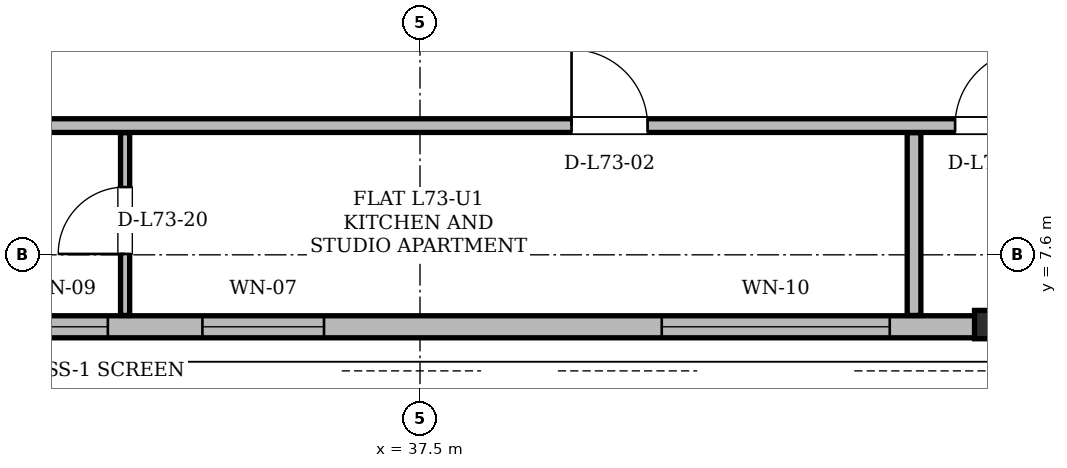
"""IFC4 building model, lengths in metres.
Left out: names, types, materials, properties, quantities, classifications, styles, units other than length and angle.
Written with IfcOpenShell. Run it as: python <this file> out.ifc"""

import sys

from ifc_helpers import new_model, si_unit, direction, frame, frame_2d, origin, origin_2d, place, context, subcontext, project, spatial, rectangle, i_section, extrude, element, fill, save


model = new_model("IFC4")
c1 = context("Model", 3, precision=1e-05, world=origin(), true_north=direction((0.0, 1.0)))
c2 = subcontext(c1, "Body", "Model", "MODEL_VIEW")
j1 = project(units=[si_unit("LENGTHUNIT", "METRE"), si_unit("PLANEANGLEUNIT", "RADIAN")], contexts=[c1])
p1 = place(None, origin())
s1 = spatial("IfcSite", under=j1, at=p1, CompositionType="ELEMENT")
p2 = place(p1, origin())
s2 = spatial("IfcBuilding", under=s1, at=p2, CompositionType="ELEMENT")
p3 = place(p2, frame((0.0, 0.0, 277.2)))
s3 = spatial("IfcBuildingStorey", under=s2, at=p3, CompositionType="ELEMENT", Elevation=277.2)
p4 = place(p3, frame((44.978, 6.653, 0.005), z_axis=(0.002384111431, 0.015057545883, 0.99988378641), x_axis=(-0.987696138675, 0.156385221957, 0.0)))
e1 = element("IfcColumn", 1, at=p4, inside=s3, PredefinedType="COLUMN", context=c2, shape_type="SweptSolid", body=[
    extrude(i_section(OverallWidth=0.373, OverallDepth=0.373, WebThickness=0.016, FlangeThickness=0.026, at=origin_2d()), origin(), (0.0, 0.0, 1.0), 3.891),
])
p5 = place(p3, frame((18.805, 6.653, 0.0), z_axis=(0.0, 0.0, 1.0), x_axis=(1.0, 0.0, 0.0)))
e2 = element("IfcWall", 2, at=p5, inside=s3, PredefinedType="SOLIDWALL", context=c2, shape_type="SweptSolid", body=[
    extrude(rectangle(XDim=37.389, YDim=0.29, at=frame_2d((18.695, 0.0))), origin(), (0.0, 0.0, 1.0), 3.058),
])
p6 = place(p5, frame((8.034, 0.0, 0.0)))
e3 = element("IfcOpeningElement", 3, at=p6, cuts=e2, PredefinedType="OPENING", context=c2, shape_type="SweptSolid", body=[
    extrude(rectangle(XDim=1.5, YDim=2.2, at=frame_2d((0.75, 1.1))), frame((0.0, 0.145, 0.0), z_axis=(0.0, -1.0, 0.0), x_axis=(1.0, 0.0, 0.0)), (0.0, 0.0, 1.0), 0.29),
])
p7 = place(p5, frame((32.25, 0.0, 0.0)))
e4 = element("IfcOpeningElement", 4, at=p7, cuts=e2, PredefinedType="OPENING", context=c2, shape_type="SweptSolid", body=[
    extrude(rectangle(XDim=1.5, YDim=2.2, at=frame_2d((0.75, 1.1))), frame((0.0, 0.145, 0.0), z_axis=(0.0, -1.0, 0.0), x_axis=(1.0, 0.0, 0.0)), (0.0, 0.0, 1.0), 0.29),
])
p8 = place(p5, frame((15.832, 0.0, 0.85)))
e5 = element("IfcOpeningElement", 5, at=p8, cuts=e2, PredefinedType="OPENING", context=c2, shape_type="SweptSolid", body=[
    extrude(rectangle(XDim=1.6, YDim=1.7, at=frame_2d((0.8, 0.85))), frame((0.0, 0.145, 0.0), z_axis=(0.0, -1.0, 0.0), x_axis=(1.0, 0.0, 0.0)), (0.0, 0.0, 1.0), 0.29),
])
p9 = place(p5, frame((21.875, 0.0, 0.85)))
e6 = element("IfcOpeningElement", 6, at=p9, cuts=e2, PredefinedType="OPENING", context=c2, shape_type="SweptSolid", body=[
    extrude(rectangle(XDim=3.0, YDim=2.098, at=frame_2d((1.5, 1.049))), frame((0.0, 0.145, 0.0), z_axis=(0.0, -1.0, 0.0), x_axis=(1.0, 0.0, 0.0)), (0.0, 0.0, 1.0), 0.29),
])
p10 = place(p5, frame((13.388, 0.0, 0.85)))
e7 = element("IfcOpeningElement", 7, at=p10, cuts=e2, PredefinedType="OPENING", context=c2, shape_type="SweptSolid", body=[
    extrude(rectangle(XDim=1.2, YDim=1.48, at=frame_2d((0.6, 0.74))), frame((0.0, 0.145, 0.0), z_axis=(0.0, -1.0, 0.0), x_axis=(1.0, 0.0, 0.0)), (0.0, 0.0, 1.0), 0.29),
])
p11 = place(p5, frame((27.673, 0.0, 0.85)))
e8 = element("IfcOpeningElement", 8, at=p11, cuts=e2, PredefinedType="OPENING", context=c2, shape_type="SweptSolid", body=[
    extrude(rectangle(XDim=1.2, YDim=1.48, at=frame_2d((0.6, 0.74))), frame((0.0, 0.145, 0.0), z_axis=(0.0, -1.0, 0.0), x_axis=(1.0, 0.0, 0.0)), (0.0, 0.0, 1.0), 0.29),
])
p12 = place(p5, frame((1.869, 0.0, 0.85)))
e9 = element("IfcOpeningElement", 9, at=p12, cuts=e2, PredefinedType="OPENING", context=c2, shape_type="SweptSolid", body=[
    extrude(rectangle(XDim=2.8, YDim=2.05, at=frame_2d((1.4, 1.025))), frame((0.0, 0.145, 0.0), z_axis=(0.0, -1.0, 0.0), x_axis=(1.0, 0.0, 0.0)), (0.0, 0.0, 1.0), 0.29),
])
p13 = place(p3, frame((25.6, 9.3, 0.0), z_axis=(0.0, 0.0, 1.0), x_axis=(1.0, 0.0, 0.0)))
e10 = element("IfcWall", 10, at=p13, inside=s3, PredefinedType="PARTITIONING", context=c2, shape_type="SweptSolid", body=[
    extrude(rectangle(XDim=21.85, YDim=0.18, at=frame_2d((10.925, 0.0))), origin(), (0.0, 0.0, 1.0), 3.68),
])
p14 = place(p13, frame((2.16, 0.0, 0.0)))
e11 = element("IfcOpeningElement", 11, at=p14, cuts=e10, PredefinedType="OPENING", context=c2, shape_type="SweptSolid", body=[
    extrude(rectangle(XDim=1.0, YDim=2.18, at=frame_2d((0.5, 1.09))), frame((0.0, 0.09, 0.0), z_axis=(0.0, -1.0, 0.0), x_axis=(1.0, 0.0, 0.0)), (0.0, 0.0, 1.0), 0.18),
])
p15 = place(p13, frame((13.894, 0.0, 0.0)))
e12 = element("IfcOpeningElement", 12, at=p15, cuts=e10, PredefinedType="OPENING", context=c2, shape_type="SweptSolid", body=[
    extrude(rectangle(XDim=1.0, YDim=2.18, at=frame_2d((0.5, 1.09))), frame((0.0, 0.09, 0.0), z_axis=(0.0, -1.0, 0.0), x_axis=(1.0, 0.0, 0.0)), (0.0, 0.0, 1.0), 0.18),
])
p16 = place(p13, frame((18.94, 0.0, 0.0)))
e13 = element("IfcOpeningElement", 13, at=p16, cuts=e10, PredefinedType="OPENING", context=c2, shape_type="SweptSolid", body=[
    extrude(rectangle(XDim=1.0, YDim=2.18, at=frame_2d((0.5, 1.09))), frame((0.0, 0.09, 0.0), z_axis=(0.0, -1.0, 0.0), x_axis=(1.0, 0.0, 0.0)), (0.0, 0.0, 1.0), 0.18),
])
p17 = place(p3, frame((33.62, 6.802, 0.0), z_axis=(0.0, 0.0, 1.0), x_axis=(0.0, 1.0, 0.0)))
e14 = element("IfcWall", 14, at=p17, inside=s3, PredefinedType="PARTITIONING", context=c2, shape_type="SweptSolid", body=[
    extrude(rectangle(XDim=2.404, YDim=0.12, at=frame_2d((1.202, 0.0))), origin(), (0.0, 0.0, 1.0), 3.68),
])
p18 = place(p17, frame((0.81, 0.0, 0.0)))
e15 = element("IfcOpeningElement", 15, at=p18, cuts=e14, PredefinedType="OPENING", context=c2, shape_type="SweptSolid", body=[
    extrude(rectangle(XDim=0.88, YDim=2.08, at=frame_2d((0.44, 1.04))), frame((0.0, 0.06, 0.0), z_axis=(0.0, -1.0, 0.0), x_axis=(1.0, 0.0, 0.0)), (0.0, 0.0, 1.0), 0.12),
])
p19 = place(p3, frame((44.0, 6.802, 0.0), z_axis=(0.0, 0.0, 1.0), x_axis=(0.0, 1.0, 0.0)))
e16 = element("IfcWall", 16, at=p19, inside=s3, PredefinedType="PARTITIONING", context=c2, shape_type="SweptSolid", body=[
    extrude(rectangle(XDim=2.404, YDim=0.18, at=frame_2d((1.202, 0.0))), origin(), (0.0, 0.0, 1.0), 3.68),
])
p20 = place(p8, origin())
e17 = element("IfcWindow", 17, at=p20, inside=s3, PartitioningType="SINGLE_PANEL", PredefinedType="WINDOW", context=c2, shape_type="SweptSolid", body=[
    extrude(rectangle(XDim=1.6, YDim=1.7, at=frame_2d((0.8, 0.85))), frame((0.0, 0.03, 0.0), z_axis=(0.0, -1.0, 0.0), x_axis=(1.0, 0.0, 0.0)), (0.0, 0.0, 1.0), 0.06),
])
fill(e5, e17)
p21 = place(p9, origin())
e18 = element("IfcWindow", 18, at=p21, inside=s3, PartitioningType="SINGLE_PANEL", PredefinedType="WINDOW", context=c2, shape_type="SweptSolid", body=[
    extrude(rectangle(XDim=3.0, YDim=2.098, at=frame_2d((1.5, 1.049))), frame((0.0, 0.03, 0.0), z_axis=(0.0, -1.0, 0.0), x_axis=(1.0, 0.0, 0.0)), (0.0, 0.0, 1.0), 0.06),
])
fill(e6, e18)
p22 = place(p10, origin())
e19 = element("IfcWindow", 19, at=p22, inside=s3, PartitioningType="SINGLE_PANEL", PredefinedType="WINDOW", context=c2, shape_type="SweptSolid", body=[
    extrude(rectangle(XDim=1.2, YDim=1.48, at=frame_2d((0.6, 0.74))), frame((0.0, 0.03, 0.0), z_axis=(0.0, -1.0, 0.0), x_axis=(1.0, 0.0, 0.0)), (0.0, 0.0, 1.0), 0.06),
])
fill(e7, e19)
p23 = place(p15, origin())
e20 = element("IfcDoor", 20, at=p23, inside=s3, OperationType="SINGLE_SWING_LEFT", PredefinedType="DOOR", context=c2, shape_type="SweptSolid", body=[
    extrude(rectangle(XDim=1.0, YDim=2.18, at=frame_2d((0.5, 1.09))), frame((0.0, 0.025, 0.0), z_axis=(0.0, -1.0, 0.0), x_axis=(1.0, 0.0, 0.0)), (0.0, 0.0, 1.0), 0.05),
])
fill(e12, e20)
p24 = place(p16, origin())
e21 = element("IfcDoor", 21, at=p24, inside=s3, OperationType="SINGLE_SWING_RIGHT", PredefinedType="DOOR", context=c2, shape_type="SweptSolid", body=[
    extrude(rectangle(XDim=1.0, YDim=2.18, at=frame_2d((0.5, 1.09))), frame((0.0, 0.025, 0.0), z_axis=(0.0, -1.0, 0.0), x_axis=(1.0, 0.0, 0.0)), (0.0, 0.0, 1.0), 0.05),
])
fill(e13, e21)
p25 = place(p18, origin())
e22 = element("IfcDoor", 22, at=p25, inside=s3, OperationType="SINGLE_SWING_LEFT", PredefinedType="DOOR", context=c2, shape_type="SweptSolid", body=[
    extrude(rectangle(XDim=0.88, YDim=2.08, at=frame_2d((0.44, 1.04))), frame((0.0, 0.025, 0.0), z_axis=(0.0, -1.0, 0.0), x_axis=(1.0, 0.0, 0.0)), (0.0, 0.0, 1.0), 0.05),
])
fill(e15, e22)
save(model, sys.argv[1])
